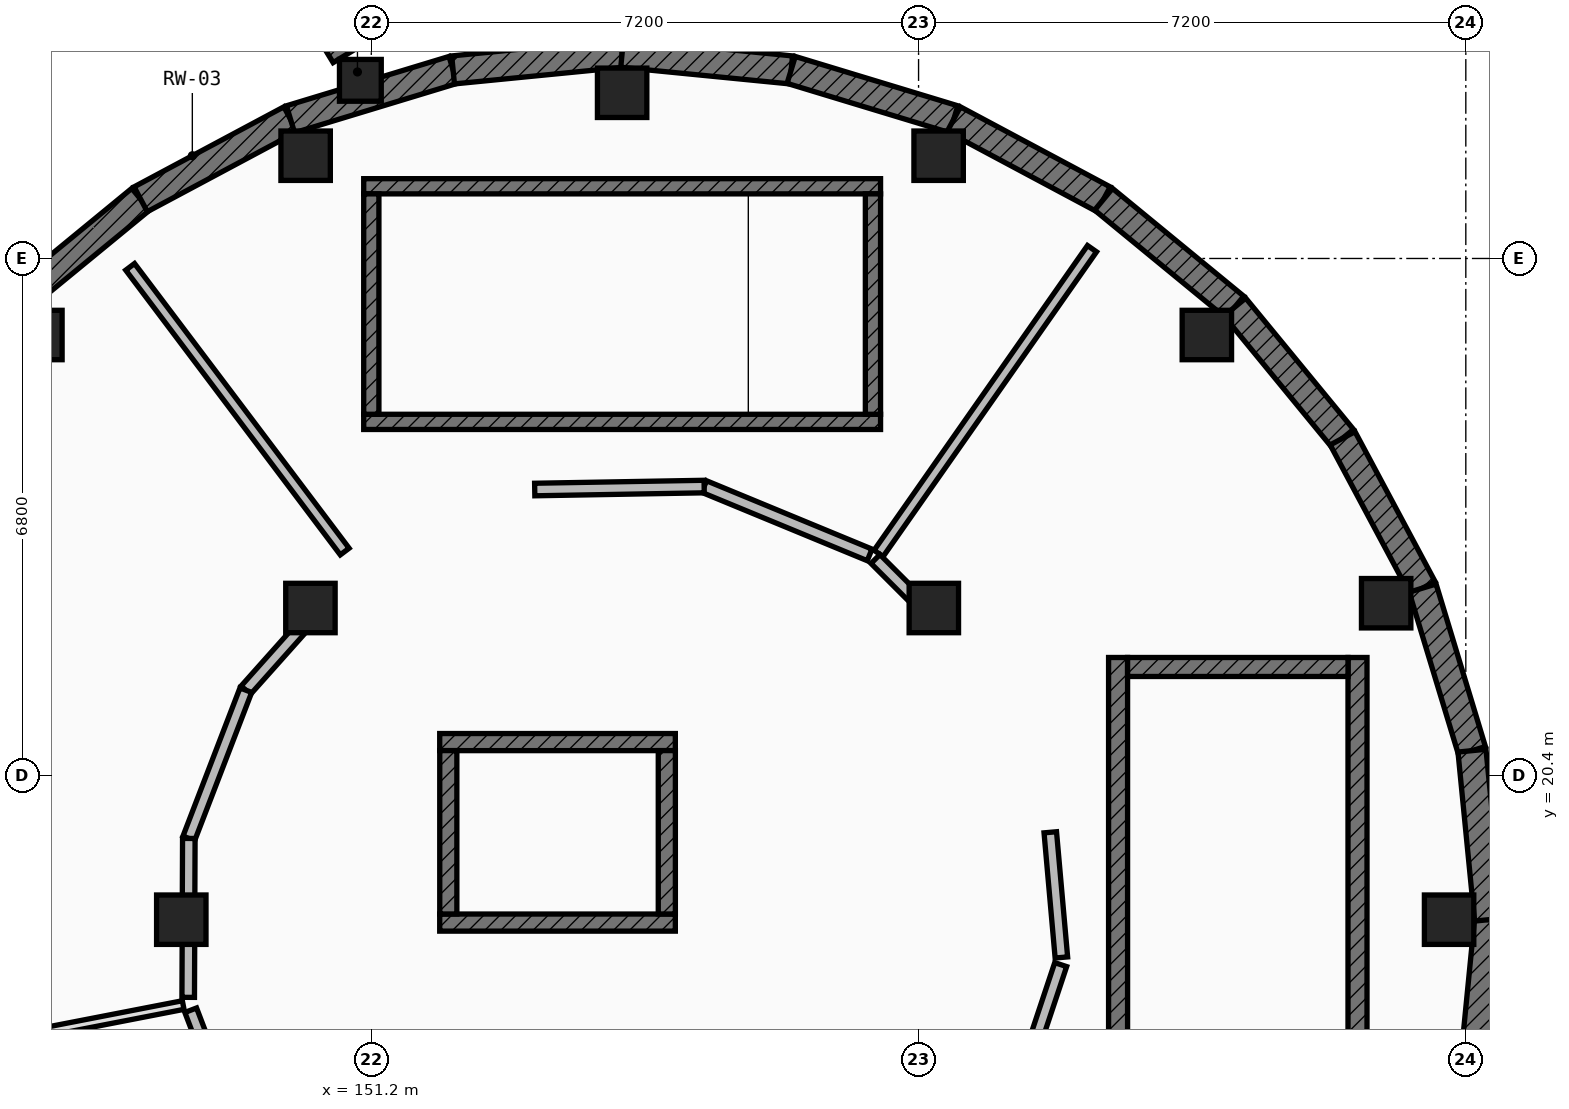
"""IFC4 building model, lengths in metres.
Left out: names, types, materials, properties, quantities, classifications, styles, units other than length and angle.
Written with IfcOpenShell. Run it as: python <this file> out.ifc"""

import sys

from ifc_helpers import new_model, si_unit, direction, frame, frame_2d, origin, origin_2d, place, context, subcontext, project, spatial, rectangle, extrude, element, fill, save


model = new_model("IFC4")
c1 = context("Model", 3, precision=1e-05, world=origin(), true_north=direction((0.0, 1.0)))
c2 = subcontext(c1, "Body", "Model", "MODEL_VIEW")
j1 = project(units=[si_unit("LENGTHUNIT", "METRE"), si_unit("PLANEANGLEUNIT", "RADIAN")], contexts=[c1])
p1 = place(None, origin())
s1 = spatial("IfcSite", under=j1, at=p1, CompositionType="ELEMENT")
p2 = place(p1, origin())
s2 = spatial("IfcBuilding", under=s1, at=p2, CompositionType="ELEMENT")
p3 = place(p2, frame((0.0, 0.0, -4.55)))
s3 = spatial("IfcBuildingStorey", under=s2, at=p3, CompositionType="ELEMENT", Elevation=-4.55)
for number, where, z_axis, x_axis in (
    (1, (165.38, 18.5, 0.0), (0.0, 0.0, 1.0), (1.0, 0.0, 0.0)),
    (2, (164.552, 22.664, 0.0), (0.0, 0.0, 1.0), (1.0, 0.0, 0.0)),
    (3, (162.193, 26.193, 0.0), (0.0, 0.0, 1.0), (1.0, 0.0, 0.0)),
    (4, (158.664, 28.552, 0.0), (0.0, 0.0, 1.0), (1.0, 0.0, 0.0)),
    (5, (154.5, 29.38, 0.0), (0.0, 0.0, 1.0), (1.0, 0.0, 0.0)),
    (6, (150.336, 28.552, 0.0), (0.0, 0.0, 1.0), (1.0, 0.0, 0.0)),
    (7, (146.807, 26.193, 0.0), (0.0, 0.0, 1.0), (1.0, 0.0, 0.0)),
    (8, (158.601, 22.601, 0.0), (0.0, 0.0, 1.0), (1.0, 0.0, 0.0)),
    (9, (150.399, 22.601, 0.0), (0.0, 0.0, 1.0), (1.0, 0.0, 0.0)),
    (10, (148.7, 18.5, 0.0), (0.0, 0.0, 1.0), (1.0, 0.0, 0.0)),
):
    element("IfcColumn", number, at=place(p3, frame(where, z_axis=z_axis, x_axis=x_axis)), inside=s3, PredefinedType="COLUMN", context=c2, shape_type="SweptSolid", body=[
        extrude(rectangle(XDim=0.65, YDim=0.65, at=origin_2d()), origin(), (0.0, 0.0, 1.0), 4.55),
    ])
p4 = place(p3, frame((151.056, 29.544, 0.0), z_axis=(0.0, 0.0, 1.0), x_axis=(1.0, 0.0, 0.0)))
e11 = element("IfcColumn", 11, at=p4, inside=s3, PredefinedType="COLUMN", context=c2, shape_type="SweptSolid", body=[
    extrude(rectangle(XDim=0.55, YDim=0.55, at=origin_2d()), origin(), (0.0, 0.0, 1.0), 4.55),
])
p5 = place(p3, frame((165.9, 18.5, 0.0), z_axis=(0.0, 0.0, 1.0), x_axis=(-0.097989369151, -0.995187461503, 0.0)))
e12 = element("IfcWall", 12, at=p5, inside=s3, PredefinedType="USERDEFINED", context=c2, shape_type="SweptSolid", body=[
    extrude(rectangle(XDim=2.235, YDim=0.37, at=frame_2d((1.117, 0.0))), origin(), (0.0, 0.0, 1.0), 3.348),
])
for number, where, z_axis, x_axis in (
    (13, (146.439, 26.561, 0.0), (0.0, 0.0, 1.0), (0.773, 0.635, 0.0)),
    (14, (148.166, 27.979, 0.0), (0.0, 0.0, 1.0), (0.882, 0.471, 0.0)),
):
    element("IfcWall", number, at=place(p3, frame(where, z_axis=z_axis, x_axis=x_axis)), inside=s3, PredefinedType="USERDEFINED", context=c2, shape_type="SweptSolid", body=[
        extrude(rectangle(XDim=2.235, YDim=0.37, at=frame_2d((1.117, 0.0))), origin(), (0.0, 0.0, 1.0), 3.348),
    ])
p6 = place(p3, frame((150.137, 29.032, 0.0), z_axis=(0.0, 0.0, 1.0), x_axis=(0.956928814218, 0.290322655883, 0.0)))
e15 = element("IfcWall", 15, at=p6, inside=s3, PredefinedType="USERDEFINED", context=c2, shape_type="SweptSolid", body=[
    extrude(rectangle(XDim=2.235, YDim=0.37, at=frame_2d((1.118, 0.0))), origin(), (0.0, 0.0, 1.0), 3.348),
])
for number, where, z_axis, x_axis in (
    (16, (152.276, 29.681, 0.0), (0.0, 0.0, 1.0), (0.995, 0.098, 0.0)),
    (17, (154.5, 29.9, 0.0), (0.0, 0.0, 1.0), (0.995, -0.098, 0.0)),
):
    element("IfcWall", number, at=place(p3, frame(where, z_axis=z_axis, x_axis=x_axis)), inside=s3, PredefinedType="USERDEFINED", context=c2, shape_type="SweptSolid", body=[
        extrude(rectangle(XDim=2.235, YDim=0.37, at=frame_2d((1.117, 0.0))), origin(), (0.0, 0.0, 1.0), 3.348),
    ])
p7 = place(p3, frame((156.724, 29.681, 0.0), z_axis=(0.0, 0.0, 1.0), x_axis=(0.956928814218, -0.290322655883, 0.0)))
e18 = element("IfcWall", 18, at=p7, inside=s3, PredefinedType="USERDEFINED", context=c2, shape_type="SweptSolid", body=[
    extrude(rectangle(XDim=2.235, YDim=0.37, at=frame_2d((1.118, 0.0))), origin(), (0.0, 0.0, 1.0), 3.348),
])
for number, where, z_axis, x_axis in (
    (19, (158.863, 29.032, 0.0), (0.0, 0.0, 1.0), (0.882, -0.471, 0.0)),
    (20, (160.834, 27.979, 0.0), (0.0, 0.0, 1.0), (0.773, -0.635, 0.0)),
    (21, (162.561, 26.561, 0.0), (0.0, 0.0, 1.0), (0.635, -0.773, 0.0)),
    (22, (163.979, 24.834, 0.0), (0.0, 0.0, 1.0), (0.471, -0.882, 0.0)),
):
    element("IfcWall", number, at=place(p3, frame(where, z_axis=z_axis, x_axis=x_axis)), inside=s3, PredefinedType="USERDEFINED", context=c2, shape_type="SweptSolid", body=[
        extrude(rectangle(XDim=2.235, YDim=0.37, at=frame_2d((1.117, 0.0))), origin(), (0.0, 0.0, 1.0), 3.348),
    ])
p8 = place(p3, frame((165.032, 22.863, 0.0), z_axis=(0.0, 0.0, 1.0), x_axis=(0.290322655883, -0.956928814218, 0.0)))
e23 = element("IfcWall", 23, at=p8, inside=s3, PredefinedType="USERDEFINED", context=c2, shape_type="SweptSolid", body=[
    extrude(rectangle(XDim=2.235, YDim=0.37, at=frame_2d((1.118, 0.0))), origin(), (0.0, 0.0, 1.0), 3.348),
])
p9 = place(p3, frame((165.681, 20.724, 0.0), z_axis=(0.0, 0.0, 1.0), x_axis=(0.097989369151, -0.995187461503, 0.0)))
e24 = element("IfcWall", 24, at=p9, inside=s3, PredefinedType="USERDEFINED", context=c2, shape_type="SweptSolid", body=[
    extrude(rectangle(XDim=2.235, YDim=0.37, at=frame_2d((1.117, 0.0))), origin(), (0.0, 0.0, 1.0), 3.348),
])
p10 = place(p3, frame((148.202, 34.241, 0.0), z_axis=(0.0, 0.0, 1.0), x_axis=(0.519278506533, -0.854605074086, 0.0)))
e25 = element("IfcWall", 25, at=p10, inside=s3, PredefinedType="USERDEFINED", context=c2, shape_type="SweptSolid", body=[
    extrude(rectangle(XDim=5.111, YDim=0.37, at=frame_2d((2.556, 0.0))), origin(), (0.0, 0.0, 1.0), 3.645),
])
p11 = place(p3, frame((161.025, 21.95, 0.0), z_axis=(0.0, 0.0, 1.0), x_axis=(0.0, -1.0, 0.0)))
e26 = element("IfcWall", 26, at=p11, inside=s3, PredefinedType="SHEAR", context=c2, shape_type="SweptSolid", body=[
    extrude(rectangle(XDim=6.9, YDim=0.25, at=frame_2d((3.45, 0.0))), origin(), (0.0, 0.0, 1.0), 4.148),
])
p12 = place(p11, frame((0.43, 0.0, 0.0)))
e27 = element("IfcOpeningElement", 27, at=p12, cuts=e26, PredefinedType="OPENING", context=c2, shape_type="SweptSolid", body=[
    extrude(rectangle(XDim=1.1, YDim=2.15, at=frame_2d((0.55, 1.075))), frame((0.0, 0.135, 0.0), z_axis=(0.0, -1.0, 0.0), x_axis=(1.0, 0.0, 0.0)), (0.0, 0.0, 1.0), 0.27),
])
p13 = place(p3, frame((164.175, 21.95, 0.0), z_axis=(0.0, 0.0, 1.0), x_axis=(0.0, -1.0, 0.0)))
e28 = element("IfcWall", 28, at=p13, inside=s3, PredefinedType="SHEAR", context=c2, shape_type="SweptSolid", body=[
    extrude(rectangle(XDim=6.9, YDim=0.25, at=frame_2d((3.45, 0.0))), origin(), (0.0, 0.0, 1.0), 4.148),
])
p14 = place(p3, frame((161.15, 21.825, 0.0), z_axis=(0.0, 0.0, 1.0), x_axis=(1.0, 0.0, 0.0)))
e29 = element("IfcWall", 29, at=p14, inside=s3, PredefinedType="SHEAR", context=c2, shape_type="SweptSolid", body=[
    extrude(rectangle(XDim=2.9, YDim=0.25, at=frame_2d((1.45, 0.0))), origin(), (0.0, 0.0, 1.0), 4.148),
])
p15 = place(p3, frame((151.1, 25.05, 0.0), z_axis=(0.0, 0.0, 1.0), x_axis=(1.0, 0.0, 0.0)))
e30 = element("IfcWall", 30, at=p15, inside=s3, PredefinedType="SHEAR", context=c2, shape_type="SweptSolid", body=[
    extrude(rectangle(XDim=6.8, YDim=0.2, at=frame_2d((3.4, 0.0))), origin(), (0.0, 0.0, 1.0), 4.148),
])
p16 = place(p15, frame((0.38, 0.0, 0.0)))
e31 = element("IfcOpeningElement", 31, at=p16, cuts=e30, PredefinedType="OPENING", context=c2, shape_type="SweptSolid", body=[
    extrude(rectangle(XDim=1.05, YDim=2.15, at=frame_2d((0.525, 1.075))), frame((0.0, 0.11, 0.0), z_axis=(0.0, -1.0, 0.0), x_axis=(1.0, 0.0, 0.0)), (0.0, 0.0, 1.0), 0.22),
])
p17 = place(p3, frame((151.1, 28.15, 0.0), z_axis=(0.0, 0.0, 1.0), x_axis=(1.0, 0.0, 0.0)))
e32 = element("IfcWall", 32, at=p17, inside=s3, PredefinedType="SHEAR", context=c2, shape_type="SweptSolid", body=[
    extrude(rectangle(XDim=6.8, YDim=0.2, at=frame_2d((3.4, 0.0))), origin(), (0.0, 0.0, 1.0), 4.148),
])
for number, where, z_axis, x_axis in (
    (33, (151.2, 25.15, 0.0), (0.0, 0.0, 1.0), (0.0, 1.0, 0.0)),
    (34, (157.8, 25.15, 0.0), (0.0, 0.0, 1.0), (0.0, 1.0, 0.0)),
):
    element("IfcWall", number, at=place(p3, frame(where, z_axis=z_axis, x_axis=x_axis)), inside=s3, PredefinedType="SHEAR", context=c2, shape_type="SweptSolid", body=[
        extrude(rectangle(XDim=2.9, YDim=0.2, at=frame_2d((1.45, 0.0))), origin(), (0.0, 0.0, 1.0), 4.148),
    ])
p18 = place(p3, frame((152.1, 18.462, 0.0), z_axis=(0.0, 0.0, 1.0), x_axis=(1.0, 0.0, 0.0)))
e35 = element("IfcWall", 35, at=p18, inside=s3, PredefinedType="SHEAR", context=c2, shape_type="SweptSolid", body=[
    extrude(rectangle(XDim=3.1, YDim=0.225, at=frame_2d((1.55, 0.0))), origin(), (0.0, 0.0, 1.0), 4.148),
])
p19 = place(p18, frame((0.95, 0.0, 0.0)))
e36 = element("IfcOpeningElement", 36, at=p19, cuts=e35, PredefinedType="OPENING", context=c2, shape_type="SweptSolid", body=[
    extrude(rectangle(XDim=1.2, YDim=2.2, at=frame_2d((0.6, 1.1))), frame((0.0, 0.123, 0.0), z_axis=(0.0, -1.0, 0.0), x_axis=(1.0, 0.0, 0.0)), (0.0, 0.0, 1.0), 0.245),
])
p20 = place(p3, frame((152.1, 20.837, 0.0), z_axis=(0.0, 0.0, 1.0), x_axis=(1.0, 0.0, 0.0)))
e37 = element("IfcWall", 37, at=p20, inside=s3, PredefinedType="SHEAR", context=c2, shape_type="SweptSolid", body=[
    extrude(rectangle(XDim=3.1, YDim=0.225, at=frame_2d((1.55, 0.0))), origin(), (0.0, 0.0, 1.0), 4.148),
])
for number, where, z_axis, x_axis in (
    (38, (152.213, 18.575, 0.0), (0.0, 0.0, 1.0), (0.0, 1.0, 0.0)),
    (39, (155.088, 18.575, 0.0), (0.0, 0.0, 1.0), (0.0, 1.0, 0.0)),
):
    element("IfcWall", number, at=place(p3, frame(where, z_axis=z_axis, x_axis=x_axis)), inside=s3, PredefinedType="SHEAR", context=c2, shape_type="SweptSolid", body=[
        extrude(rectangle(XDim=2.15, YDim=0.225, at=frame_2d((1.075, 0.0))), origin(), (0.0, 0.0, 1.0), 4.148),
    ])
p21 = place(p3, frame((157.874, 23.319, 0.0), z_axis=(0.0, 0.0, 1.0), x_axis=(0.573579487823, 0.819149907617, 0.0)))
e40 = element("IfcWall", 40, at=p21, inside=s3, PredefinedType="PARTITIONING", context=c2, shape_type="SweptSolid", body=[
    extrude(rectangle(XDim=4.895, YDim=0.145, at=frame_2d((2.448, 0.0))), origin(), (0.0, 0.0, 1.0), 3.323),
])
p22 = place(p3, frame((150.85, 23.344, 0.0), z_axis=(0.0, 0.0, 1.0), x_axis=(-0.601830514666, 0.798623836118, 0.0)))
e41 = element("IfcWall", 41, at=p22, inside=s3, PredefinedType="PARTITIONING", context=c2, shape_type="SweptSolid", body=[
    extrude(rectangle(XDim=4.691, YDim=0.145, at=frame_2d((2.345, 0.0))), origin(), (0.0, 0.0, 1.0), 3.323),
])
p23 = place(p3, frame((148.725, 17.377, 0.0), z_axis=(0.0, 0.0, 1.0), x_axis=(-0.981631167978, -0.190788495604, 0.0)))
e42 = element("IfcWall", 42, at=p23, inside=s3, PredefinedType="PARTITIONING", context=c2, shape_type="SweptSolid", body=[
    extrude(rectangle(XDim=4.911, YDim=0.115, at=frame_2d((2.456, 0.0))), origin(), (0.0, 0.0, 1.0), 3.323),
])
p24 = place(p3, frame((157.756, 23.3, 0.0), z_axis=(0.0, 0.0, 1.0), x_axis=(-0.924301971465, 0.381661978124, 0.0)))
e43 = element("IfcWall", 43, at=p24, inside=s3, PredefinedType="PARTITIONING", context=c2, shape_type="SweptSolid", body=[
    extrude(rectangle(XDim=2.355, YDim=0.165, at=frame_2d((1.178, 0.0))), origin(), (0.0, 0.0, 1.0), 3.323),
])
p25 = place(p24, frame((0.668, 0.0, 0.0)))
e44 = element("IfcOpeningElement", 44, at=p25, cuts=e43, PredefinedType="OPENING", context=c2, shape_type="SweptSolid", body=[
    extrude(rectangle(XDim=1.02, YDim=2.2, at=frame_2d((0.51, 1.1))), frame((0.0, 0.093, 0.0), z_axis=(0.0, -1.0, 0.0), x_axis=(1.0, 0.0, 0.0)), (0.0, 0.0, 1.0), 0.185),
])
p26 = place(p3, frame((155.579, 24.199, 0.0), z_axis=(0.0, 0.0, 1.0), x_axis=(-0.999846478786, -0.017521953626, 0.0)))
e45 = element("IfcWall", 45, at=p26, inside=s3, PredefinedType="PARTITIONING", context=c2, shape_type="SweptSolid", body=[
    extrude(rectangle(XDim=2.229, YDim=0.165, at=frame_2d((1.115, 0.0))), origin(), (0.0, 0.0, 1.0), 3.323),
])
p27 = place(p3, frame((150.251, 22.307, 0.0), z_axis=(0.0, 0.0, 1.0), x_axis=(-0.665670610056, -0.746245696073, 0.0)))
e46 = element("IfcWall", 46, at=p27, inside=s3, PredefinedType="PARTITIONING", context=c2, shape_type="SweptSolid", body=[
    extrude(rectangle(XDim=1.054, YDim=0.165, at=frame_2d((0.527, 0.0))), origin(), (0.0, 0.0, 1.0), 3.323),
])
p28 = place(p3, frame((149.549, 21.52, 0.0), z_axis=(0.0, 0.0, 1.0), x_axis=(-0.358830356871, -0.93340279354, 0.0)))
e47 = element("IfcWall", 47, at=p28, inside=s3, PredefinedType="PARTITIONING", context=c2, shape_type="SweptSolid", body=[
    extrude(rectangle(XDim=2.09, YDim=0.165, at=frame_2d((1.045, 0.0))), origin(), (0.0, 0.0, 1.0), 3.323),
])
p29 = place(p28, frame((0.385, 0.0, 0.0)))
e48 = element("IfcOpeningElement", 48, at=p29, cuts=e47, PredefinedType="OPENING", context=c2, shape_type="SweptSolid", body=[
    extrude(rectangle(XDim=1.32, YDim=2.24, at=frame_2d((0.66, 1.12))), frame((0.0, 0.093, 0.0), z_axis=(0.0, -1.0, 0.0), x_axis=(1.0, 0.0, 0.0)), (0.0, 0.0, 1.0), 0.185),
])
p30 = place(p3, frame((148.799, 19.569, 0.0), z_axis=(0.0, 0.0, 1.0), x_axis=(-0.004213900998, -0.99999112148, 0.0)))
e49 = element("IfcWall", 49, at=p30, inside=s3, PredefinedType="PARTITIONING", context=c2, shape_type="SweptSolid", body=[
    extrude(rectangle(XDim=0.753, YDim=0.165, at=frame_2d((0.376, 0.0))), origin(), (0.0, 0.0, 1.0), 3.323),
])
p31 = place(p3, frame((148.794, 18.184, 0.0), z_axis=(0.0, 0.0, 1.0), x_axis=(-0.004149341873, -0.999991391444, 0.0)))
e50 = element("IfcWall", 50, at=p31, inside=s3, PredefinedType="PARTITIONING", context=c2, shape_type="SweptSolid", body=[
    extrude(rectangle(XDim=0.706, YDim=0.165, at=frame_2d((0.353, 0.0))), origin(), (0.0, 0.0, 1.0), 3.323),
])
p32 = place(p3, frame((148.824, 17.309, 0.0), z_axis=(0.0, 0.0, 1.0), x_axis=(0.356746140056, -0.934201365636, 0.0)))
e51 = element("IfcWall", 51, at=p32, inside=s3, PredefinedType="PARTITIONING", context=c2, shape_type="SweptSolid", body=[
    extrude(rectangle(XDim=1.825, YDim=0.165, at=frame_2d((0.913, 0.0))), origin(), (0.0, 0.0, 1.0), 3.323),
])
p33 = place(p32, frame((0.472, 0.0, 0.0)))
e52 = element("IfcOpeningElement", 52, at=p33, cuts=e51, PredefinedType="OPENING", context=c2, shape_type="SweptSolid", body=[
    extrude(rectangle(XDim=0.88, YDim=2.1, at=frame_2d((0.44, 1.05))), frame((0.0, 0.093, 0.0), z_axis=(0.0, -1.0, 0.0), x_axis=(1.0, 0.0, 0.0)), (0.0, 0.0, 1.0), 0.185),
])
p34 = place(p3, frame((159.472, 15.513, 0.0), z_axis=(0.0, 0.0, 1.0), x_axis=(0.316024745021, 0.94875094758, 0.0)))
e53 = element("IfcWall", 53, at=p34, inside=s3, PredefinedType="PARTITIONING", context=c2, shape_type="SweptSolid", body=[
    extrude(rectangle(XDim=2.525, YDim=0.165, at=frame_2d((1.263, 0.0))), origin(), (0.0, 0.0, 1.0), 3.323),
])
p35 = place(p34, frame((0.823, 0.0, 0.0)))
e54 = element("IfcOpeningElement", 54, at=p35, cuts=e53, PredefinedType="OPENING", context=c2, shape_type="SweptSolid", body=[
    extrude(rectangle(XDim=0.88, YDim=2.1, at=frame_2d((0.44, 1.05))), frame((0.0, 0.093, 0.0), z_axis=(0.0, -1.0, 0.0), x_axis=(1.0, 0.0, 0.0)), (0.0, 0.0, 1.0), 0.185),
])
p36 = place(p3, frame((160.279, 18.003, 0.0), z_axis=(0.0, 0.0, 1.0), x_axis=(-0.088298877472, 0.996094025801, 0.0)))
e55 = element("IfcWall", 55, at=p36, inside=s3, PredefinedType="PARTITIONING", context=c2, shape_type="SweptSolid", body=[
    extrude(rectangle(XDim=1.653, YDim=0.165, at=frame_2d((0.827, 0.0))), origin(), (0.0, 0.0, 1.0), 3.323),
])
p37 = place(p3, frame((158.315, 22.764, 0.0), z_axis=(0.0, 0.0, 1.0), x_axis=(-0.706927698814, 0.707285818216, 0.0)))
e56 = element("IfcWall", 56, at=p37, inside=s3, PredefinedType="PARTITIONING", context=c2, shape_type="SweptSolid", body=[
    extrude(rectangle(XDim=0.682, YDim=0.165, at=frame_2d((0.341, 0.0))), origin(), (0.0, 0.0, 1.0), 3.323),
])
p38 = place(p12, origin())
e57 = element("IfcDoor", 57, at=p38, inside=s3, OperationType="SINGLE_SWING_LEFT", PredefinedType="DOOR", context=c2, shape_type="SweptSolid", body=[
    extrude(rectangle(XDim=1.1, YDim=2.15, at=frame_2d((0.55, 1.075))), frame((0.0, 0.025, 0.0), z_axis=(0.0, -1.0, 0.0), x_axis=(1.0, 0.0, 0.0)), (0.0, 0.0, 1.0), 0.05),
])
fill(e27, e57)
p39 = place(p16, origin())
e58 = element("IfcDoor", 58, at=p39, inside=s3, OperationType="SINGLE_SWING_LEFT", PredefinedType="DOOR", context=c2, shape_type="SweptSolid", body=[
    extrude(rectangle(XDim=1.05, YDim=2.15, at=frame_2d((0.525, 1.075))), frame((0.0, 0.025, 0.0), z_axis=(0.0, -1.0, 0.0), x_axis=(1.0, 0.0, 0.0)), (0.0, 0.0, 1.0), 0.05),
])
fill(e31, e58)
p40 = place(p19, origin())
e59 = element("IfcDoor", 59, at=p40, inside=s3, OperationType="DOUBLE_DOOR_SLIDING", PredefinedType="DOOR", context=c2, shape_type="SweptSolid", body=[
    extrude(rectangle(XDim=1.2, YDim=2.2, at=frame_2d((0.6, 1.1))), frame((0.0, 0.025, 0.0), z_axis=(0.0, -1.0, 0.0), x_axis=(1.0, 0.0, 0.0)), (0.0, 0.0, 1.0), 0.05),
])
fill(e36, e59)
p41 = place(p25, origin())
e60 = element("IfcDoor", 60, at=p41, inside=s3, OperationType="SINGLE_SWING_RIGHT", PredefinedType="DOOR", context=c2, shape_type="SweptSolid", body=[
    extrude(rectangle(XDim=1.02, YDim=2.2, at=frame_2d((0.51, 1.1))), frame((0.0, 0.025, 0.0), z_axis=(0.0, -1.0, 0.0), x_axis=(1.0, 0.0, 0.0)), (0.0, 0.0, 1.0), 0.05),
])
fill(e44, e60)
p42 = place(p29, origin())
e61 = element("IfcDoor", 61, at=p42, inside=s3, OperationType="SINGLE_SWING_LEFT", PredefinedType="DOOR", context=c2, shape_type="SweptSolid", body=[
    extrude(rectangle(XDim=1.32, YDim=2.24, at=frame_2d((0.66, 1.12))), frame((0.0, 0.025, 0.0), z_axis=(0.0, -1.0, 0.0), x_axis=(1.0, 0.0, 0.0)), (0.0, 0.0, 1.0), 0.05),
])
fill(e48, e61)
p43 = place(p35, origin())
e62 = element("IfcDoor", 62, at=p43, inside=s3, OperationType="SINGLE_SWING_RIGHT", PredefinedType="DOOR", context=c2, shape_type="SweptSolid", body=[
    extrude(rectangle(XDim=0.88, YDim=2.1, at=frame_2d((0.44, 1.05))), frame((0.0, 0.025, 0.0), z_axis=(0.0, -1.0, 0.0), x_axis=(1.0, 0.0, 0.0)), (0.0, 0.0, 1.0), 0.05),
])
fill(e54, e62)
save(model, sys.argv[1])
